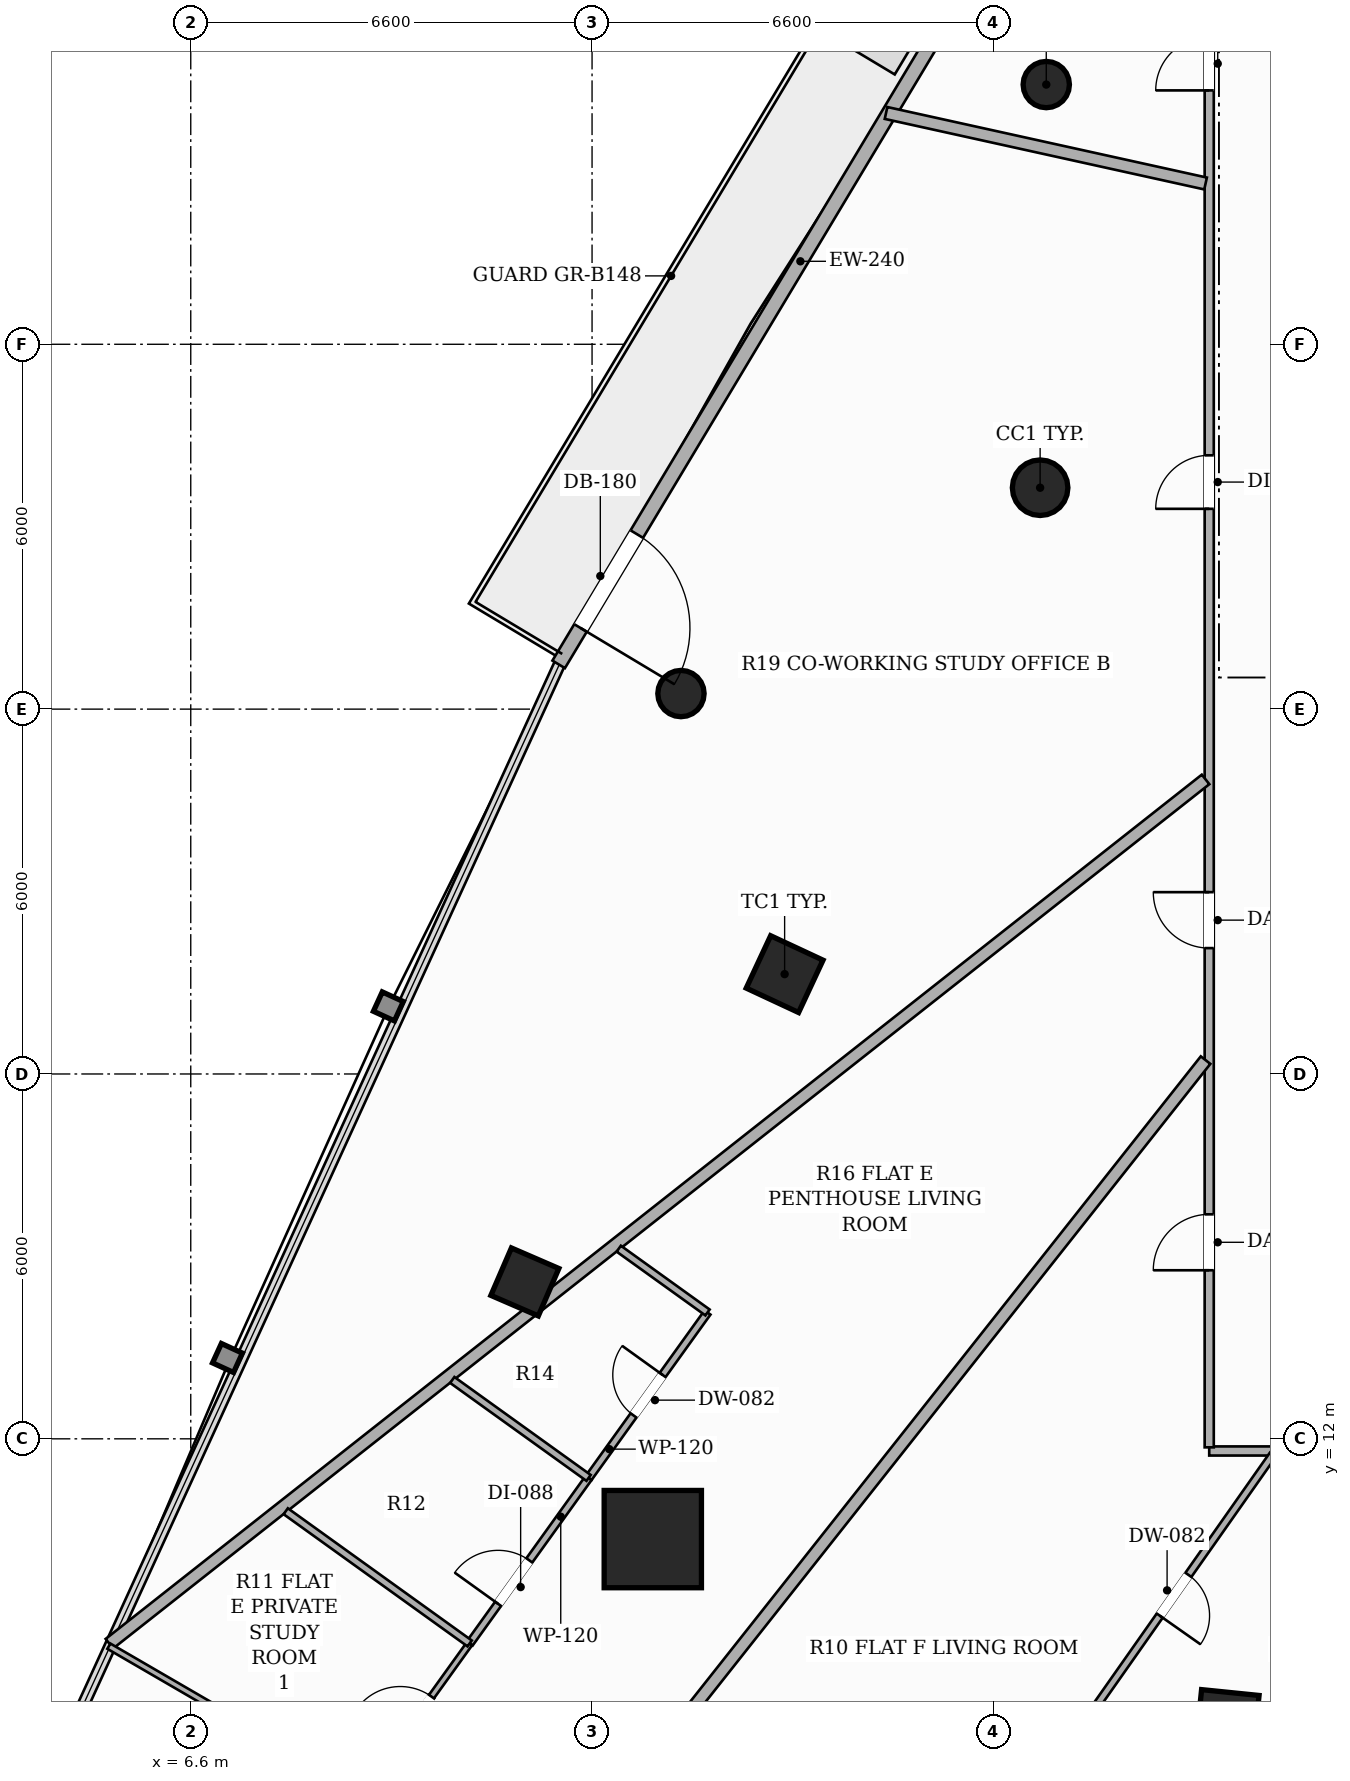
"""IFC4 building model, lengths in metres.
Left out: names, types, materials, properties, quantities, classifications, styles, units other than length and angle.
Written with IfcOpenShell. Run it as: python <this file> out.ifc"""

import sys

from ifc_helpers import new_model, si_unit, direction, frame, frame_2d, origin, origin_2d, place, context, subcontext, project, spatial, rectangle, hollow_rectangle, hollow_circle, extrude, element, fill, save


model = new_model("IFC4")
c1 = context("Model", 3, precision=1e-05, world=origin(), true_north=direction((0.0, 1.0)))
c2 = subcontext(c1, "Body", "Model", "MODEL_VIEW")
j1 = project(units=[si_unit("LENGTHUNIT", "METRE"), si_unit("PLANEANGLEUNIT", "RADIAN")], contexts=[c1])
p1 = place(None, origin())
s1 = spatial("IfcSite", under=j1, at=p1, CompositionType="ELEMENT")
p2 = place(p1, origin())
s2 = spatial("IfcBuilding", under=s1, at=p2, CompositionType="ELEMENT")
p3 = place(p2, frame((0.0, 0.0, 53.3)))
s3 = spatial("IfcBuildingStorey", under=s2, at=p3, CompositionType="ELEMENT", Elevation=53.3)
p4 = place(p3, frame((14.199, 10.351, 0.0), z_axis=(0.0, 0.0, 1.0), x_axis=(1.0, 0.0, 0.0)))
e1 = element("IfcColumn", 1, at=p4, inside=s3, PredefinedType="COLUMN", context=c2, shape_type="SweptSolid", body=[
    extrude(hollow_rectangle(XDim=1.6, YDim=1.6, WallThickness=0.05, at=origin_2d()), origin(), (0.0, 0.0, 1.0), 3.3),
])
p5 = place(p3, frame((20.569, 27.641, 0.0), z_axis=(0.0, 0.0, 1.0), x_axis=(1.0, 0.0, 0.0)))
e2 = element("IfcColumn", 2, at=p5, inside=s3, PredefinedType="COLUMN", context=c2, shape_type="SweptSolid", body=[
    extrude(hollow_circle(Radius=0.457, WallThickness=0.025, at=origin_2d()), origin(), (0.0, 0.0, 1.0), 3.3),
])
for number, where, z_axis, x_axis in (
    (3, (16.367, 19.642, 0.0), (0.0, 0.0, 1.0), (0.423, 0.906, 0.0)),
    (4, (23.649, 7.355, 0.0), (0.0, 0.0, 1.0), (-0.995, 0.101, 0.0)),
):
    element("IfcColumn", number, at=place(p3, frame(where, z_axis=z_axis, x_axis=x_axis)), inside=s3, PredefinedType="COLUMN", context=c2, shape_type="SweptSolid", body=[
        extrude(hollow_rectangle(XDim=0.95, YDim=0.95, WallThickness=0.032, at=origin_2d()), origin(), (0.0, 0.0, 1.0), 3.3),
    ])
p6 = place(p3, frame((12.095, 14.58, 0.0), z_axis=(0.0, 0.0, 1.0), x_axis=(0.397147890635, 0.917754625684, 0.0)))
e5 = element("IfcColumn", 5, at=p6, inside=s3, PredefinedType="COLUMN", context=c2, shape_type="SweptSolid", body=[
    extrude(hollow_rectangle(XDim=0.85, YDim=0.85, WallThickness=0.028, at=origin_2d()), origin(), (0.0, 0.0, 1.0), 3.3),
])
for number, where, z_axis, x_axis in (
    (6, (20.67, 34.271, 0.0), (0.0, 0.0, 1.0), (1.0, 0.0, 0.0)),
    (7, (14.662, 24.256, 0.0), (0.0, 0.0, 1.0), (1.0, 0.0, 0.0)),
):
    element("IfcColumn", number, at=place(p3, frame(where, z_axis=z_axis, x_axis=x_axis)), inside=s3, PredefinedType="COLUMN", context=c2, shape_type="SweptSolid", body=[
        extrude(hollow_circle(Radius=0.381, WallThickness=0.022, at=origin_2d()), origin(), (0.0, 0.0, 1.0), 3.3),
    ])
p7 = place(p3, frame((19.265, 35.765, 0.0), z_axis=(0.0, 0.0, 1.0), x_axis=(-0.51430869017, -0.857605137121, 0.0)))
e8 = element("IfcWall", 8, at=p7, inside=s3, PredefinedType="SOLIDWALL", context=c2, shape_type="SweptSolid", body=[
    extrude(rectangle(XDim=12.86, YDim=0.24, at=frame_2d((6.43, 0.0))), origin(), (0.0, 0.0, 1.0), 2.624),
])
p8 = place(p7, frame((10.362, 0.0, 0.0)))
e9 = element("IfcOpeningElement", 9, at=p8, cuts=e8, PredefinedType="OPENING", context=c2, shape_type="SweptSolid", body=[
    extrude(rectangle(XDim=1.8, YDim=2.2, at=frame_2d((0.9, 1.1))), frame((0.0, 0.13, 0.0), z_axis=(0.0, -1.0, 0.0), x_axis=(1.0, 0.0, 0.0)), (0.0, 0.0, 1.0), 0.26),
])
p9 = place(p3, frame((42.59, 11.8, 0.0), z_axis=(0.0, 0.0, 1.0), x_axis=(-1.0, 0.0, 0.0)))
e10 = element("IfcWall", 10, at=p9, inside=s3, PredefinedType="PARTITIONING", context=c2, shape_type="SweptSolid", body=[
    extrude(rectangle(XDim=19.24, YDim=0.15, at=frame_2d((9.62, 0.0))), origin(), (0.0, 0.0, 1.0), 2.669),
])
p10 = place(p9, frame((11.355, 0.0, 0.0)))
e11 = element("IfcOpeningElement", 11, at=p10, cuts=e10, PredefinedType="OPENING", context=c2, shape_type="SweptSolid", body=[
    extrude(rectangle(XDim=0.92, YDim=2.15, at=frame_2d((0.46, 1.075))), frame((0.0, 0.085, 0.0), z_axis=(0.0, -1.0, 0.0), x_axis=(1.0, 0.0, 0.0)), (0.0, 0.0, 1.0), 0.17),
])
p11 = place(p9, frame((3.524, 0.0, 0.0)))
e12 = element("IfcOpeningElement", 12, at=p11, cuts=e10, PredefinedType="OPENING", context=c2, shape_type="SweptSolid", body=[
    extrude(rectangle(XDim=0.88, YDim=2.1, at=frame_2d((0.44, 1.05))), frame((0.0, 0.085, 0.0), z_axis=(0.0, -1.0, 0.0), x_axis=(1.0, 0.0, 0.0)), (0.0, 0.0, 1.0), 0.17),
])
p12 = place(p3, frame((23.35, 11.86, 0.0), z_axis=(0.0, 0.0, 1.0), x_axis=(0.0, 1.0, 0.0)))
e13 = element("IfcWall", 13, at=p12, inside=s3, PredefinedType="PARTITIONING", context=c2, shape_type="SweptSolid", body=[
    extrude(rectangle(XDim=25.04, YDim=0.15, at=frame_2d((12.52, 0.0))), origin(), (0.0, 0.0, 1.0), 2.413),
])
p13 = place(p12, frame((15.434, 0.0, 0.0)))
e14 = element("IfcOpeningElement", 14, at=p13, cuts=e13, PredefinedType="OPENING", context=c2, shape_type="SweptSolid", body=[
    extrude(rectangle(XDim=0.88, YDim=2.1, at=frame_2d((0.44, 1.05))), frame((0.0, 0.085, 0.0), z_axis=(0.0, -1.0, 0.0), x_axis=(1.0, 0.0, 0.0)), (0.0, 0.0, 1.0), 0.17),
])
p14 = place(p12, frame((22.315, 0.0, 0.0)))
e15 = element("IfcOpeningElement", 15, at=p14, cuts=e13, PredefinedType="OPENING", context=c2, shape_type="SweptSolid", body=[
    extrude(rectangle(XDim=0.88, YDim=2.1, at=frame_2d((0.44, 1.05))), frame((0.0, 0.085, 0.0), z_axis=(0.0, -1.0, 0.0), x_axis=(1.0, 0.0, 0.0)), (0.0, 0.0, 1.0), 0.17),
])
p15 = place(p12, frame((8.21, 0.0, 0.0)))
e16 = element("IfcOpeningElement", 16, at=p15, cuts=e13, PredefinedType="OPENING", context=c2, shape_type="SweptSolid", body=[
    extrude(rectangle(XDim=0.92, YDim=2.15, at=frame_2d((0.46, 1.075))), frame((0.0, 0.085, 0.0), z_axis=(0.0, -1.0, 0.0), x_axis=(1.0, 0.0, 0.0)), (0.0, 0.0, 1.0), 0.17),
])
p16 = place(p12, frame((2.912, 0.0, 0.0)))
e17 = element("IfcOpeningElement", 17, at=p16, cuts=e13, PredefinedType="OPENING", context=c2, shape_type="SweptSolid", body=[
    extrude(rectangle(XDim=0.92, YDim=2.15, at=frame_2d((0.46, 1.075))), frame((0.0, 0.085, 0.0), z_axis=(0.0, -1.0, 0.0), x_axis=(1.0, 0.0, 0.0)), (0.0, 0.0, 1.0), 0.17),
])
p17 = place(p3, frame((18.035, 33.804, 0.0), z_axis=(0.0, 0.0, 1.0), x_axis=(0.976496681047, -0.215532438172, 0.0)))
e18 = element("IfcWall", 18, at=p17, inside=s3, PredefinedType="PARTITIONING", context=c2, shape_type="SweptSolid", body=[
    extrude(rectangle(XDim=5.382, YDim=0.2, at=frame_2d((2.691, 0.0))), origin(), (0.0, 0.0, 1.0), 2.413),
])
p18 = place(p3, frame((23.29, 22.844, 0.0), z_axis=(0.0, 0.0, 1.0), x_axis=(-0.785302077685, -0.619112790034, 0.0)))
e19 = element("IfcWall", 19, at=p18, inside=s3, PredefinedType="PARTITIONING", context=c2, shape_type="SweptSolid", body=[
    extrude(rectangle(XDim=22.957, YDim=0.2, at=frame_2d((11.479, 0.0))), origin(), (0.0, 0.0, 1.0), 2.413),
])
p19 = place(p3, frame((23.29, 18.228, 0.0), z_axis=(0.0, 0.0, 1.0), x_axis=(-0.620501189922, -0.784205504511, 0.0)))
e20 = element("IfcWall", 20, at=p19, inside=s3, PredefinedType="PARTITIONING", context=c2, shape_type="SweptSolid", body=[
    extrude(rectangle(XDim=19.188, YDim=0.2, at=frame_2d((9.594, 0.0))), origin(), (0.0, 0.0, 1.0), 2.413),
])
p20 = place(p3, frame((26.579, 11.74, 0.0), z_axis=(0.0, 0.0, 1.0), x_axis=(-0.32385337678, -0.946107282684, 0.0)))
e21 = element("IfcWall", 21, at=p20, inside=s3, PredefinedType="PARTITIONING", context=c2, shape_type="SweptSolid", body=[
    extrude(rectangle(XDim=10.378, YDim=0.2, at=frame_2d((5.189, 0.0))), origin(), (0.0, 0.0, 1.0), 2.413),
])
p21 = place(p3, frame((13.143, 11.357, 0.0), z_axis=(0.0, 0.0, 1.0), x_axis=(0.583709603858, 0.811962498127, 0.0)))
e22 = element("IfcWall", 22, at=p21, inside=s3, PredefinedType="PARTITIONING", context=c2, shape_type="SweptSolid", body=[
    extrude(rectangle(XDim=3.351, YDim=0.12, at=frame_2d((1.676, 0.0))), origin(), (0.0, 0.0, 1.0), 2.413),
])
p22 = place(p21, frame((1.266, 0.0, 0.0)))
e23 = element("IfcOpeningElement", 23, at=p22, cuts=e22, PredefinedType="OPENING", context=c2, shape_type="SweptSolid", body=[
    extrude(rectangle(XDim=0.82, YDim=2.1, at=frame_2d((0.41, 1.05))), frame((0.0, 0.07, 0.0), z_axis=(0.0, -1.0, 0.0), x_axis=(1.0, 0.0, 0.0)), (0.0, 0.0, 1.0), 0.14),
])
p23 = place(p3, frame((15.099, 14.078, 0.0), z_axis=(0.0, 0.0, 1.0), x_axis=(-0.812134003072, 0.583470959906, 0.0)))
e24 = element("IfcWall", 24, at=p23, inside=s3, PredefinedType="PARTITIONING", context=c2, shape_type="SweptSolid", body=[
    extrude(rectangle(XDim=1.798, YDim=0.12, at=frame_2d((0.899, 0.0))), origin(), (0.0, 0.0, 1.0), 3.06),
])
p24 = place(p3, frame((11.187, 8.635, 0.0), z_axis=(0.0, 0.0, 1.0), x_axis=(0.583571510595, 0.812061753823, 0.0)))
e25 = element("IfcWall", 25, at=p24, inside=s3, PredefinedType="PARTITIONING", context=c2, shape_type="SweptSolid", body=[
    extrude(rectangle(XDim=3.352, YDim=0.12, at=frame_2d((1.676, 0.0))), origin(), (0.0, 0.0, 1.0), 2.619),
])
p25 = place(p24, frame((0.802, 0.0, 0.0)))
e26 = element("IfcOpeningElement", 26, at=p25, cuts=e25, PredefinedType="OPENING", context=c2, shape_type="SweptSolid", body=[
    extrude(rectangle(XDim=0.88, YDim=2.1, at=frame_2d((0.44, 1.05))), frame((0.0, 0.07, 0.0), z_axis=(0.0, -1.0, 0.0), x_axis=(1.0, 0.0, 0.0)), (0.0, 0.0, 1.0), 0.14),
])
p26 = place(p3, frame((9.417, 6.172, 0.0), z_axis=(0.0, 0.0, 1.0), x_axis=(0.583596240012, 0.812043981964, 0.0)))
e27 = element("IfcWall", 27, at=p26, inside=s3, PredefinedType="PARTITIONING", context=c2, shape_type="SweptSolid", body=[
    extrude(rectangle(XDim=3.033, YDim=0.1, at=frame_2d((1.517, 0.0))), origin(), (0.0, 0.0, 1.0), 2.619),
])
p27 = place(p26, frame((1.077, 0.0, 0.0)))
e28 = element("IfcOpeningElement", 28, at=p27, cuts=e27, PredefinedType="OPENING", context=c2, shape_type="SweptSolid", body=[
    extrude(rectangle(XDim=0.88, YDim=2.1, at=frame_2d((0.44, 1.05))), frame((0.0, 0.06, 0.0), z_axis=(0.0, -1.0, 0.0), x_axis=(1.0, 0.0, 0.0)), (0.0, 0.0, 1.0), 0.12),
])
p28 = place(p3, frame((13.143, 11.357, 0.0), z_axis=(0.0, 0.0, 1.0), x_axis=(-0.812099176387, 0.583519432162, 0.0)))
e29 = element("IfcWall", 29, at=p28, inside=s3, PredefinedType="PARTITIONING", context=c2, shape_type="SweptSolid", body=[
    extrude(rectangle(XDim=2.761, YDim=0.12, at=frame_2d((1.38, 0.0))), origin(), (0.0, 0.0, 1.0), 3.06),
])
p29 = place(p3, frame((11.187, 8.635, 0.0), z_axis=(0.0, 0.0, 1.0), x_axis=(-0.812025077548, 0.583622543629, 0.0)))
e30 = element("IfcWall", 30, at=p29, inside=s3, PredefinedType="PARTITIONING", context=c2, shape_type="SweptSolid", body=[
    extrude(rectangle(XDim=3.725, YDim=0.12, at=frame_2d((1.863, 0.0))), origin(), (0.0, 0.0, 1.0), 2.619),
])
p30 = place(p3, frame((5.253, 8.59, 0.0), z_axis=(0.0, 0.0, 1.0), x_axis=(0.864777582771, -0.502155087932, 0.0)))
e31 = element("IfcWall", 31, at=p30, inside=s3, PredefinedType="PARTITIONING", context=c2, shape_type="SweptSolid", body=[
    extrude(rectangle(XDim=4.815, YDim=0.1, at=frame_2d((2.408, 0.0))), origin(), (0.0, 0.0, 1.0), 3.06),
])
p31 = place(p3, frame((24.398, 11.74, 0.0), z_axis=(0.0, 0.0, 1.0), x_axis=(-0.575258030062, -0.817972003707, 0.0)))
e32 = element("IfcWall", 32, at=p31, inside=s3, PredefinedType="PARTITIONING", context=c2, shape_type="SweptSolid", body=[
    extrude(rectangle(XDim=5.653, YDim=0.12, at=frame_2d((2.827, 0.0))), origin(), (0.0, 0.0, 1.0), 2.413),
])
p32 = place(p31, frame((2.417, 0.0, 0.0)))
e33 = element("IfcOpeningElement", 33, at=p32, cuts=e32, PredefinedType="OPENING", context=c2, shape_type="SweptSolid", body=[
    extrude(rectangle(XDim=0.82, YDim=2.1, at=frame_2d((0.41, 1.05))), frame((0.0, 0.07, 0.0), z_axis=(0.0, -1.0, 0.0), x_axis=(1.0, 0.0, 0.0)), (0.0, 0.0, 1.0), 0.14),
])
p33 = place(p8, origin())
e34 = element("IfcDoor", 34, at=p33, inside=s3, OperationType="SINGLE_SWING_RIGHT", PredefinedType="DOOR", context=c2, shape_type="SweptSolid", body=[
    extrude(rectangle(XDim=1.8, YDim=2.2, at=frame_2d((0.9, 1.1))), frame((0.0, 0.025, 0.0), z_axis=(0.0, -1.0, 0.0), x_axis=(1.0, 0.0, 0.0)), (0.0, 0.0, 1.0), 0.05),
])
fill(e9, e34)
p34 = place(p13, origin())
e35 = element("IfcDoor", 35, at=p34, inside=s3, OperationType="SINGLE_SWING_LEFT", PredefinedType="DOOR", context=c2, shape_type="SweptSolid", body=[
    extrude(rectangle(XDim=0.88, YDim=2.1, at=frame_2d((0.44, 1.05))), frame((0.0, 0.025, 0.0), z_axis=(0.0, -1.0, 0.0), x_axis=(1.0, 0.0, 0.0)), (0.0, 0.0, 1.0), 0.05),
])
fill(e14, e35)
p35 = place(p14, origin())
e36 = element("IfcDoor", 36, at=p35, inside=s3, OperationType="SINGLE_SWING_LEFT", PredefinedType="DOOR", context=c2, shape_type="SweptSolid", body=[
    extrude(rectangle(XDim=0.88, YDim=2.1, at=frame_2d((0.44, 1.05))), frame((0.0, 0.025, 0.0), z_axis=(0.0, -1.0, 0.0), x_axis=(1.0, 0.0, 0.0)), (0.0, 0.0, 1.0), 0.05),
])
fill(e15, e36)
p36 = place(p15, origin())
e37 = element("IfcDoor", 37, at=p36, inside=s3, OperationType="SINGLE_SWING_RIGHT", PredefinedType="DOOR", context=c2, shape_type="SweptSolid", body=[
    extrude(rectangle(XDim=0.92, YDim=2.15, at=frame_2d((0.46, 1.075))), frame((0.0, 0.025, 0.0), z_axis=(0.0, -1.0, 0.0), x_axis=(1.0, 0.0, 0.0)), (0.0, 0.0, 1.0), 0.05),
])
fill(e16, e37)
p37 = place(p22, origin())
e38 = element("IfcDoor", 38, at=p37, inside=s3, OperationType="SINGLE_SWING_RIGHT", PredefinedType="DOOR", context=c2, shape_type="SweptSolid", body=[
    extrude(rectangle(XDim=0.82, YDim=2.1, at=frame_2d((0.41, 1.05))), frame((0.0, 0.025, 0.0), z_axis=(0.0, -1.0, 0.0), x_axis=(1.0, 0.0, 0.0)), (0.0, 0.0, 1.0), 0.05),
])
fill(e23, e38)
p38 = place(p25, origin())
e39 = element("IfcDoor", 39, at=p38, inside=s3, OperationType="SINGLE_SWING_LEFT", PredefinedType="DOOR", context=c2, shape_type="SweptSolid", body=[
    extrude(rectangle(XDim=0.88, YDim=2.1, at=frame_2d((0.44, 1.05))), frame((0.0, 0.025, 0.0), z_axis=(0.0, -1.0, 0.0), x_axis=(1.0, 0.0, 0.0)), (0.0, 0.0, 1.0), 0.05),
])
fill(e26, e39)
p39 = place(p27, origin())
e40 = element("IfcDoor", 40, at=p39, inside=s3, OperationType="SINGLE_SWING_LEFT", PredefinedType="DOOR", context=c2, shape_type="SweptSolid", body=[
    extrude(rectangle(XDim=0.88, YDim=2.1, at=frame_2d((0.44, 1.05))), frame((0.0, 0.025, 0.0), z_axis=(0.0, -1.0, 0.0), x_axis=(1.0, 0.0, 0.0)), (0.0, 0.0, 1.0), 0.05),
])
fill(e28, e40)
p40 = place(p16, origin())
e41 = element("IfcDoor", 41, at=p40, inside=s3, OperationType="SINGLE_SWING_LEFT", PredefinedType="DOOR", context=c2, shape_type="SweptSolid", body=[
    extrude(rectangle(XDim=0.92, YDim=2.15, at=frame_2d((0.46, 1.075))), frame((0.0, 0.025, 0.0), z_axis=(0.0, -1.0, 0.0), x_axis=(1.0, 0.0, 0.0)), (0.0, 0.0, 1.0), 0.05),
])
fill(e17, e41)
p41 = place(p32, origin())
e42 = element("IfcDoor", 42, at=p41, inside=s3, OperationType="SINGLE_SWING_RIGHT", PredefinedType="DOOR", context=c2, shape_type="SweptSolid", body=[
    extrude(rectangle(XDim=0.82, YDim=2.1, at=frame_2d((0.41, 1.05))), frame((0.0, 0.025, 0.0), z_axis=(0.0, -1.0, 0.0), x_axis=(1.0, 0.0, 0.0)), (0.0, 0.0, 1.0), 0.05),
])
fill(e33, e42)
save(model, sys.argv[1])
